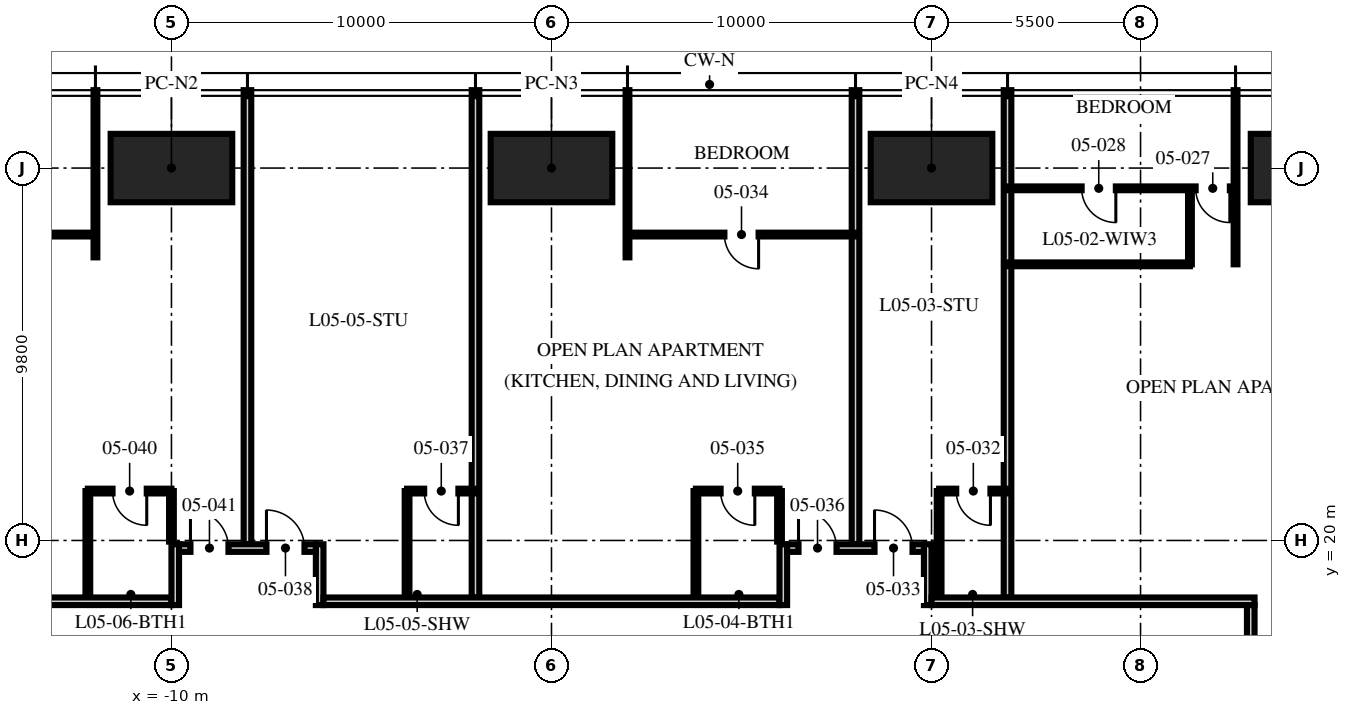
"""IFC4 building model, lengths in metres.
Left out: names, types, materials, properties, quantities, classifications, styles, units other than length and angle.
Written with IfcOpenShell. Run it as: python <this file> out.ifc"""

import sys

from ifc_helpers import new_model, si_unit, direction, frame, frame_2d, origin, origin_2d, place, context, subcontext, project, spatial, rectangle, hollow_rectangle, extrude, element, fill, save


model = new_model("IFC4")
c1 = context("Model", 3, precision=1e-05, world=origin(), true_north=direction((0.0, 1.0)))
c2 = subcontext(c1, "Body", "Model", "MODEL_VIEW")
j1 = project(units=[si_unit("LENGTHUNIT", "METRE"), si_unit("PLANEANGLEUNIT", "RADIAN")], contexts=[c1])
p1 = place(None, origin())
s1 = spatial("IfcSite", under=j1, at=p1, CompositionType="ELEMENT")
p2 = place(p1, origin())
s2 = spatial("IfcBuilding", under=s1, at=p2, CompositionType="ELEMENT")
p3 = place(p2, frame((0.0, 0.0, 24.75)))
s3 = spatial("IfcBuildingStorey", under=s2, at=p3, CompositionType="ELEMENT", Elevation=24.75)
for number, where, z_axis, x_axis in (
    (1, (-10.0, 29.8, 0.0), (0.0, 0.0, 1.0), (1.0, 0.0, 0.0)),
    (2, (0.0, 29.8, 0.0), (0.0, 0.0, 1.0), (1.0, 0.0, 0.0)),
    (3, (10.0, 29.8, 0.0), (0.0, 0.0, 1.0), (1.0, 0.0, 0.0)),
    (4, (20.0, 29.8, 0.0), (0.0, 0.0, 1.0), (1.0, 0.0, 0.0)),
):
    element("IfcColumn", number, at=place(p3, frame(where, z_axis=z_axis, x_axis=x_axis)), inside=s3, PredefinedType="COLUMN", context=c2, shape_type="SweptSolid", body=[
        extrude(hollow_rectangle(XDim=3.2, YDim=1.8, WallThickness=0.2, at=origin_2d()), origin(), (0.0, 0.0, 1.0), 3.75),
    ])
p4 = place(p3, frame((18.0, 27.267, 0.0), z_axis=(0.0, 0.0, 1.0), x_axis=(0.0, 1.0, 0.0)))
e5 = element("IfcWall", 5, at=p4, inside=s3, PredefinedType="PARTITIONING", context=c2, shape_type="SweptSolid", body=[
    extrude(rectangle(XDim=4.583, YDim=0.1, at=frame_2d((2.292, 0.0))), origin(), (0.0, 0.0, 1.0), 2.71),
])
p5 = place(p3, frame((12.0, 18.5, 0.0), z_axis=(0.0, 0.0, 1.0), x_axis=(0.0, 1.0, 0.0)))
e6 = element("IfcWall", 6, at=p5, inside=s3, PredefinedType="PARTITIONING", context=c2, shape_type="SweptSolid", body=[
    extrude(rectangle(XDim=13.35, YDim=0.2, at=frame_2d((6.675, 0.0))), origin(), (0.0, 0.0, 1.0), 2.71),
])
p6 = place(p3, frame((8.0, 19.9, 0.0), z_axis=(0.0, 0.0, 1.0), x_axis=(0.0, 1.0, 0.0)))
e7 = element("IfcWall", 7, at=p6, inside=s3, PredefinedType="PARTITIONING", context=c2, shape_type="SweptSolid", body=[
    extrude(rectangle(XDim=11.95, YDim=0.2, at=frame_2d((5.975, 0.0))), origin(), (0.0, 0.0, 1.0), 2.71),
])
p7 = place(p3, frame((2.0, 27.45, 0.0), z_axis=(0.0, 0.0, 1.0), x_axis=(0.0, 1.0, 0.0)))
e8 = element("IfcWall", 8, at=p7, inside=s3, PredefinedType="PARTITIONING", context=c2, shape_type="SweptSolid", body=[
    extrude(rectangle(XDim=4.4, YDim=0.1, at=frame_2d((2.2, 0.0))), origin(), (0.0, 0.0, 1.0), 2.71),
])
p8 = place(p3, frame((-2.0, 18.5, 0.0), z_axis=(0.0, 0.0, 1.0), x_axis=(0.0, 1.0, 0.0)))
e9 = element("IfcWall", 9, at=p8, inside=s3, PredefinedType="PARTITIONING", context=c2, shape_type="SweptSolid", body=[
    extrude(rectangle(XDim=13.35, YDim=0.2, at=frame_2d((6.675, 0.0))), origin(), (0.0, 0.0, 1.0), 2.71),
])
p9 = place(p3, frame((-8.0, 19.9, 0.0), z_axis=(0.0, 0.0, 1.0), x_axis=(0.0, 1.0, 0.0)))
e10 = element("IfcWall", 10, at=p9, inside=s3, PredefinedType="PARTITIONING", context=c2, shape_type="SweptSolid", body=[
    extrude(rectangle(XDim=11.95, YDim=0.2, at=frame_2d((5.975, 0.0))), origin(), (0.0, 0.0, 1.0), 2.71),
])
p10 = place(p3, frame((-12.0, 27.45, 0.0), z_axis=(0.0, 0.0, 1.0), x_axis=(0.0, 1.0, 0.0)))
e11 = element("IfcWall", 11, at=p10, inside=s3, PredefinedType="PARTITIONING", context=c2, shape_type="SweptSolid", body=[
    extrude(rectangle(XDim=4.4, YDim=0.1, at=frame_2d((2.2, 0.0))), origin(), (0.0, 0.0, 1.0), 2.71),
])
p11 = place(p3, frame((18.0, 29.267, 0.0), z_axis=(0.0, 0.0, 1.0), x_axis=(-1.0, 0.0, 0.0)))
e12 = element("IfcWall", 12, at=p11, inside=s3, PredefinedType="PARTITIONING", context=c2, shape_type="SweptSolid", body=[
    extrude(rectangle(XDim=6.0, YDim=0.1, at=frame_2d((3.0, 0.0))), origin(), (0.0, 0.0, 1.0), 2.61),
])
p12 = place(p11, frame((0.15, 0.0, 0.0)))
e13 = element("IfcOpeningElement", 13, at=p12, cuts=e12, PredefinedType="OPENING", context=c2, shape_type="SweptSolid", body=[
    extrude(rectangle(XDim=0.9, YDim=2.1, at=frame_2d((0.45, 1.05))), frame((0.0, 0.06, 0.0), z_axis=(0.0, -1.0, 0.0), x_axis=(1.0, 0.0, 0.0)), (0.0, 0.0, 1.0), 0.12),
])
p13 = place(p11, frame((3.15, 0.0, 0.0)))
e14 = element("IfcOpeningElement", 14, at=p13, cuts=e12, PredefinedType="OPENING", context=c2, shape_type="SweptSolid", body=[
    extrude(rectangle(XDim=0.9, YDim=2.1, at=frame_2d((0.45, 1.05))), frame((0.0, 0.06, 0.0), z_axis=(0.0, -1.0, 0.0), x_axis=(1.0, 0.0, 0.0)), (0.0, 0.0, 1.0), 0.12),
])
p14 = place(p3, frame((16.8, 27.267, 0.0), z_axis=(0.0, 0.0, 1.0), x_axis=(0.0, 1.0, 0.0)))
e15 = element("IfcWall", 15, at=p14, inside=s3, PredefinedType="PARTITIONING", context=c2, shape_type="SweptSolid", body=[
    extrude(rectangle(XDim=2.0, YDim=0.1, at=frame_2d((1.0, 0.0))), origin(), (0.0, 0.0, 1.0), 3.5),
])
p15 = place(p3, frame((16.8, 27.267, 0.0), z_axis=(0.0, 0.0, 1.0), x_axis=(-1.0, 0.0, 0.0)))
e16 = element("IfcWall", 16, at=p15, inside=s3, PredefinedType="PARTITIONING", context=c2, shape_type="SweptSolid", body=[
    extrude(rectangle(XDim=4.8, YDim=0.1, at=frame_2d((2.4, 0.0))), origin(), (0.0, 0.0, 1.0), 2.61),
])
p16 = place(p3, frame((12.0, 21.3, 0.0), z_axis=(0.0, 0.0, 1.0), x_axis=(-1.0, 0.0, 0.0)))
e17 = element("IfcWall", 17, at=p16, inside=s3, PredefinedType="PARTITIONING", context=c2, shape_type="SweptSolid", body=[
    extrude(rectangle(XDim=1.8, YDim=0.125, at=frame_2d((0.9, 0.0))), origin(), (0.0, 0.0, 1.0), 3.5),
])
p17 = place(p16, frame((0.45, 0.0, 0.0)))
e18 = element("IfcOpeningElement", 18, at=p17, cuts=e17, PredefinedType="OPENING", context=c2, shape_type="SweptSolid", body=[
    extrude(rectangle(XDim=0.9, YDim=2.1, at=frame_2d((0.45, 1.05))), frame((0.0, 0.073, 0.0), z_axis=(0.0, -1.0, 0.0), x_axis=(1.0, 0.0, 0.0)), (0.0, 0.0, 1.0), 0.145),
])
p18 = place(p3, frame((10.2, 18.5, 0.0), z_axis=(0.0, 0.0, 1.0), x_axis=(0.0, 1.0, 0.0)))
e19 = element("IfcWall", 19, at=p18, inside=s3, PredefinedType="PARTITIONING", context=c2, shape_type="SweptSolid", body=[
    extrude(rectangle(XDim=2.8, YDim=0.125, at=frame_2d((1.4, 0.0))), origin(), (0.0, 0.0, 1.0), 2.492),
])
p19 = place(p3, frame((8.0, 28.05, 0.0), z_axis=(0.0, 0.0, 1.0), x_axis=(-1.0, 0.0, 0.0)))
e20 = element("IfcWall", 20, at=p19, inside=s3, PredefinedType="PARTITIONING", context=c2, shape_type="SweptSolid", body=[
    extrude(rectangle(XDim=6.0, YDim=0.1, at=frame_2d((3.0, 0.0))), origin(), (0.0, 0.0, 1.0), 2.61),
])
p20 = place(p19, frame((2.55, 0.0, 0.0)))
e21 = element("IfcOpeningElement", 21, at=p20, cuts=e20, PredefinedType="OPENING", context=c2, shape_type="SweptSolid", body=[
    extrude(rectangle(XDim=0.9, YDim=2.1, at=frame_2d((0.45, 1.05))), frame((0.0, 0.06, 0.0), z_axis=(0.0, -1.0, 0.0), x_axis=(1.0, 0.0, 0.0)), (0.0, 0.0, 1.0), 0.12),
])
p21 = place(p3, frame((6.0, 21.3, 0.0), z_axis=(0.0, 0.0, 1.0), x_axis=(-1.0, 0.0, 0.0)))
e22 = element("IfcWall", 22, at=p21, inside=s3, PredefinedType="PARTITIONING", context=c2, shape_type="SweptSolid", body=[
    extrude(rectangle(XDim=2.2, YDim=0.125, at=frame_2d((1.1, 0.0))), origin(), (0.0, 0.0, 1.0), 2.61),
])
p22 = place(p21, frame((0.65, 0.0, 0.0)))
e23 = element("IfcOpeningElement", 23, at=p22, cuts=e22, PredefinedType="OPENING", context=c2, shape_type="SweptSolid", body=[
    extrude(rectangle(XDim=0.9, YDim=2.1, at=frame_2d((0.45, 1.05))), frame((0.0, 0.073, 0.0), z_axis=(0.0, -1.0, 0.0), x_axis=(1.0, 0.0, 0.0)), (0.0, 0.0, 1.0), 0.145),
])
p23 = place(p3, frame((6.0, 19.97, 0.0), z_axis=(0.0, 0.0, 1.0), x_axis=(0.0, 1.0, 0.0)))
e24 = element("IfcWall", 24, at=p23, inside=s3, PredefinedType="PARTITIONING", context=c2, shape_type="SweptSolid", body=[
    extrude(rectangle(XDim=1.33, YDim=0.125, at=frame_2d((0.665, 0.0))), origin(), (0.0, 0.0, 1.0), 3.5),
])
p24 = place(p3, frame((3.8, 18.5, 0.0), z_axis=(0.0, 0.0, 1.0), x_axis=(0.0, 1.0, 0.0)))
e25 = element("IfcWall", 25, at=p24, inside=s3, PredefinedType="PARTITIONING", context=c2, shape_type="SweptSolid", body=[
    extrude(rectangle(XDim=2.8, YDim=0.125, at=frame_2d((1.4, 0.0))), origin(), (0.0, 0.0, 1.0), 3.5),
])
p25 = place(p3, frame((-2.0, 21.3, 0.0), z_axis=(0.0, 0.0, 1.0), x_axis=(-1.0, 0.0, 0.0)))
e26 = element("IfcWall", 26, at=p25, inside=s3, PredefinedType="PARTITIONING", context=c2, shape_type="SweptSolid", body=[
    extrude(rectangle(XDim=1.8, YDim=0.125, at=frame_2d((0.9, 0.0))), origin(), (0.0, 0.0, 1.0), 3.5),
])
p26 = place(p25, frame((0.45, 0.0, 0.0)))
e27 = element("IfcOpeningElement", 27, at=p26, cuts=e26, PredefinedType="OPENING", context=c2, shape_type="SweptSolid", body=[
    extrude(rectangle(XDim=0.9, YDim=2.1, at=frame_2d((0.45, 1.05))), frame((0.0, 0.073, 0.0), z_axis=(0.0, -1.0, 0.0), x_axis=(1.0, 0.0, 0.0)), (0.0, 0.0, 1.0), 0.145),
])
p27 = place(p3, frame((-3.8, 18.5, 0.0), z_axis=(0.0, 0.0, 1.0), x_axis=(0.0, 1.0, 0.0)))
e28 = element("IfcWall", 28, at=p27, inside=s3, PredefinedType="PARTITIONING", context=c2, shape_type="SweptSolid", body=[
    extrude(rectangle(XDim=2.8, YDim=0.125, at=frame_2d((1.4, 0.0))), origin(), (0.0, 0.0, 1.0), 3.5),
])
p28 = place(p3, frame((-12.0, 28.05, 0.0), z_axis=(0.0, 0.0, 1.0), x_axis=(-1.0, 0.0, 0.0)))
e29 = element("IfcWall", 29, at=p28, inside=s3, PredefinedType="PARTITIONING", context=c2, shape_type="SweptSolid", body=[
    extrude(rectangle(XDim=6.0, YDim=0.1, at=frame_2d((3.0, 0.0))), origin(), (0.0, 0.0, 1.0), 2.61),
])
p29 = place(p28, frame((2.55, 0.0, 0.0)))
e30 = element("IfcOpeningElement", 30, at=p29, cuts=e29, PredefinedType="OPENING", context=c2, shape_type="SweptSolid", body=[
    extrude(rectangle(XDim=0.9, YDim=2.1, at=frame_2d((0.45, 1.05))), frame((0.0, 0.06, 0.0), z_axis=(0.0, -1.0, 0.0), x_axis=(1.0, 0.0, 0.0)), (0.0, 0.0, 1.0), 0.12),
])
p30 = place(p3, frame((-10.0, 21.3, 0.0), z_axis=(0.0, 0.0, 1.0), x_axis=(-1.0, 0.0, 0.0)))
e31 = element("IfcWall", 31, at=p30, inside=s3, PredefinedType="PARTITIONING", context=c2, shape_type="SweptSolid", body=[
    extrude(rectangle(XDim=2.2, YDim=0.125, at=frame_2d((1.1, 0.0))), origin(), (0.0, 0.0, 1.0), 2.492),
])
p31 = place(p30, frame((0.65, 0.0, 0.0)))
e32 = element("IfcOpeningElement", 32, at=p31, cuts=e31, PredefinedType="OPENING", context=c2, shape_type="SweptSolid", body=[
    extrude(rectangle(XDim=0.9, YDim=2.1, at=frame_2d((0.45, 1.05))), frame((0.0, 0.073, 0.0), z_axis=(0.0, -1.0, 0.0), x_axis=(1.0, 0.0, 0.0)), (0.0, 0.0, 1.0), 0.145),
])
p32 = place(p3, frame((-10.0, 19.97, 0.0), z_axis=(0.0, 0.0, 1.0), x_axis=(0.0, 1.0, 0.0)))
e33 = element("IfcWall", 33, at=p32, inside=s3, PredefinedType="PARTITIONING", context=c2, shape_type="SweptSolid", body=[
    extrude(rectangle(XDim=1.33, YDim=0.125, at=frame_2d((0.665, 0.0))), origin(), (0.0, 0.0, 1.0), 2.492),
])
p33 = place(p3, frame((-12.2, 18.5, 0.0), z_axis=(0.0, 0.0, 1.0), x_axis=(0.0, 1.0, 0.0)))
e34 = element("IfcWall", 34, at=p33, inside=s3, PredefinedType="PARTITIONING", context=c2, shape_type="SweptSolid", body=[
    extrude(rectangle(XDim=2.8, YDim=0.125, at=frame_2d((1.4, 0.0))), origin(), (0.0, 0.0, 1.0), 3.5),
])
p34 = place(p3, frame((18.4, 0.0, 0.0), z_axis=(0.0, 0.0, 1.0), x_axis=(0.0, 1.0, 0.0)))
e35 = element("IfcWall", 35, at=p34, inside=s3, PredefinedType="PARTITIONING", context=c2, shape_type="SweptSolid", body=[
    extrude(rectangle(XDim=18.3, YDim=0.2, at=frame_2d((9.15, 0.0))), origin(), (0.0, 0.0, 1.0), 2.3),
])
p35 = place(p3, frame((-18.5, 18.4, 0.0), z_axis=(0.0, 0.0, 1.0), x_axis=(1.0, 0.0, 0.0)))
e36 = element("IfcWall", 36, at=p35, inside=s3, PredefinedType="PARTITIONING", context=c2, shape_type="SweptSolid", body=[
    extrude(rectangle(XDim=8.5, YDim=0.2, at=frame_2d((4.25, 0.0))), origin(), (0.0, 0.0, 1.0), 2.3),
])
p36 = place(p3, frame((-9.9, 18.3, 0.0), z_axis=(0.0, 0.0, 1.0), x_axis=(0.0, 1.0, 0.0)))
e37 = element("IfcWall", 37, at=p36, inside=s3, PredefinedType="PARTITIONING", context=c2, shape_type="SweptSolid", body=[
    extrude(rectangle(XDim=1.6, YDim=0.2, at=frame_2d((0.8, 0.0))), origin(), (0.0, 0.0, 1.0), 2.492),
])
p37 = place(p3, frame((-6.1, 18.3, 0.0), z_axis=(0.0, 0.0, 1.0), x_axis=(0.0, 1.0, 0.0)))
e38 = element("IfcWall", 38, at=p37, inside=s3, PredefinedType="PARTITIONING", context=c2, shape_type="SweptSolid", body=[
    extrude(rectangle(XDim=1.6, YDim=0.2, at=frame_2d((0.8, 0.0))), origin(), (0.0, 0.0, 1.0), 3.5),
])
p38 = place(p3, frame((-9.8, 19.8, 0.0), z_axis=(0.0, 0.0, 1.0), x_axis=(1.0, 0.0, 0.0)))
e39 = element("IfcWall", 39, at=p38, inside=s3, PredefinedType="PARTITIONING", context=c2, shape_type="SweptSolid", body=[
    extrude(rectangle(XDim=3.6, YDim=0.2, at=frame_2d((1.8, 0.0))), origin(), (0.0, 0.0, 1.0), 3.5),
])
p39 = place(p38, frame((2.3, 0.0, 0.0)))
e40 = element("IfcOpeningElement", 40, at=p39, cuts=e39, PredefinedType="OPENING", context=c2, shape_type="SweptSolid", body=[
    extrude(rectangle(XDim=1.0, YDim=2.2, at=frame_2d((0.5, 1.1))), frame((0.0, 0.11, 0.0), z_axis=(0.0, -1.0, 0.0), x_axis=(1.0, 0.0, 0.0)), (0.0, 0.0, 1.0), 0.22),
])
p40 = place(p38, frame((0.3, 0.0, 0.0)))
e41 = element("IfcOpeningElement", 41, at=p40, cuts=e39, PredefinedType="OPENING", context=c2, shape_type="SweptSolid", body=[
    extrude(rectangle(XDim=1.0, YDim=2.2, at=frame_2d((0.5, 1.1))), frame((0.0, 0.11, 0.0), z_axis=(0.0, -1.0, 0.0), x_axis=(1.0, 0.0, 0.0)), (0.0, 0.0, 1.0), 0.22),
])
p41 = place(p3, frame((-6.0, 18.4, 0.0), z_axis=(0.0, 0.0, 1.0), x_axis=(1.0, 0.0, 0.0)))
e42 = element("IfcWall", 42, at=p41, inside=s3, PredefinedType="PARTITIONING", context=c2, shape_type="SweptSolid", body=[
    extrude(rectangle(XDim=12.0, YDim=0.2, at=frame_2d((6.0, 0.0))), origin(), (0.0, 0.0, 1.0), 2.492),
])
p42 = place(p3, frame((6.1, 18.3, 0.0), z_axis=(0.0, 0.0, 1.0), x_axis=(0.0, 1.0, 0.0)))
e43 = element("IfcWall", 43, at=p42, inside=s3, PredefinedType="PARTITIONING", context=c2, shape_type="SweptSolid", body=[
    extrude(rectangle(XDim=1.6, YDim=0.2, at=frame_2d((0.8, 0.0))), origin(), (0.0, 0.0, 1.0), 3.5),
])
p43 = place(p3, frame((9.9, 18.3, 0.0), z_axis=(0.0, 0.0, 1.0), x_axis=(0.0, 1.0, 0.0)))
e44 = element("IfcWall", 44, at=p43, inside=s3, PredefinedType="PARTITIONING", context=c2, shape_type="SweptSolid", body=[
    extrude(rectangle(XDim=1.6, YDim=0.2, at=frame_2d((0.8, 0.0))), origin(), (0.0, 0.0, 1.0), 2.492),
])
p44 = place(p3, frame((6.2, 19.8, 0.0), z_axis=(0.0, 0.0, 1.0), x_axis=(1.0, 0.0, 0.0)))
e45 = element("IfcWall", 45, at=p44, inside=s3, PredefinedType="PARTITIONING", context=c2, shape_type="SweptSolid", body=[
    extrude(rectangle(XDim=3.6, YDim=0.2, at=frame_2d((1.8, 0.0))), origin(), (0.0, 0.0, 1.0), 3.5),
])
p45 = place(p44, frame((2.3, 0.0, 0.0)))
e46 = element("IfcOpeningElement", 46, at=p45, cuts=e45, PredefinedType="OPENING", context=c2, shape_type="SweptSolid", body=[
    extrude(rectangle(XDim=1.0, YDim=2.2, at=frame_2d((0.5, 1.1))), frame((0.0, 0.11, 0.0), z_axis=(0.0, -1.0, 0.0), x_axis=(1.0, 0.0, 0.0)), (0.0, 0.0, 1.0), 0.22),
])
p46 = place(p44, frame((0.3, 0.0, 0.0)))
e47 = element("IfcOpeningElement", 47, at=p46, cuts=e45, PredefinedType="OPENING", context=c2, shape_type="SweptSolid", body=[
    extrude(rectangle(XDim=1.0, YDim=2.2, at=frame_2d((0.5, 1.1))), frame((0.0, 0.11, 0.0), z_axis=(0.0, -1.0, 0.0), x_axis=(1.0, 0.0, 0.0)), (0.0, 0.0, 1.0), 0.22),
])
p47 = place(p3, frame((10.0, 18.4, 0.0), z_axis=(0.0, 0.0, 1.0), x_axis=(1.0, 0.0, 0.0)))
e48 = element("IfcWall", 48, at=p47, inside=s3, PredefinedType="PARTITIONING", context=c2, shape_type="SweptSolid", body=[
    extrude(rectangle(XDim=8.5, YDim=0.2, at=frame_2d((4.25, 0.0))), origin(), (0.0, 0.0, 1.0), 2.3),
])
p48 = place(p12, origin())
e49 = element("IfcDoor", 49, at=p48, inside=s3, OperationType="SINGLE_SWING_LEFT", PredefinedType="DOOR", context=c2, shape_type="SweptSolid", body=[
    extrude(rectangle(XDim=0.9, YDim=2.1, at=frame_2d((0.45, 1.05))), frame((0.0, 0.025, 0.0), z_axis=(0.0, -1.0, 0.0), x_axis=(1.0, 0.0, 0.0)), (0.0, 0.0, 1.0), 0.05),
])
fill(e13, e49)
p49 = place(p13, origin())
e50 = element("IfcDoor", 50, at=p49, inside=s3, OperationType="SINGLE_SWING_LEFT", PredefinedType="DOOR", context=c2, shape_type="SweptSolid", body=[
    extrude(rectangle(XDim=0.9, YDim=2.1, at=frame_2d((0.45, 1.05))), frame((0.0, 0.025, 0.0), z_axis=(0.0, -1.0, 0.0), x_axis=(1.0, 0.0, 0.0)), (0.0, 0.0, 1.0), 0.05),
])
fill(e14, e50)
p50 = place(p17, origin())
e51 = element("IfcDoor", 51, at=p50, inside=s3, OperationType="SINGLE_SWING_LEFT", PredefinedType="DOOR", context=c2, shape_type="SweptSolid", body=[
    extrude(rectangle(XDim=0.9, YDim=2.1, at=frame_2d((0.45, 1.05))), frame((0.0, 0.025, 0.0), z_axis=(0.0, -1.0, 0.0), x_axis=(1.0, 0.0, 0.0)), (0.0, 0.0, 1.0), 0.05),
])
fill(e18, e51)
p51 = place(p45, origin())
e52 = element("IfcDoor", 52, at=p51, inside=s3, OperationType="SINGLE_SWING_LEFT", PredefinedType="DOOR", context=c2, shape_type="SweptSolid", body=[
    extrude(rectangle(XDim=1.0, YDim=2.2, at=frame_2d((0.5, 1.1))), frame((0.0, 0.025, 0.0), z_axis=(0.0, -1.0, 0.0), x_axis=(1.0, 0.0, 0.0)), (0.0, 0.0, 1.0), 0.05),
])
fill(e46, e52)
p52 = place(p20, origin())
e53 = element("IfcDoor", 53, at=p52, inside=s3, OperationType="SINGLE_SWING_LEFT", PredefinedType="DOOR", context=c2, shape_type="SweptSolid", body=[
    extrude(rectangle(XDim=0.9, YDim=2.1, at=frame_2d((0.45, 1.05))), frame((0.0, 0.025, 0.0), z_axis=(0.0, -1.0, 0.0), x_axis=(1.0, 0.0, 0.0)), (0.0, 0.0, 1.0), 0.05),
])
fill(e21, e53)
p53 = place(p22, origin())
e54 = element("IfcDoor", 54, at=p53, inside=s3, OperationType="SINGLE_SWING_LEFT", PredefinedType="DOOR", context=c2, shape_type="SweptSolid", body=[
    extrude(rectangle(XDim=0.9, YDim=2.1, at=frame_2d((0.45, 1.05))), frame((0.0, 0.025, 0.0), z_axis=(0.0, -1.0, 0.0), x_axis=(1.0, 0.0, 0.0)), (0.0, 0.0, 1.0), 0.05),
])
fill(e23, e54)
p54 = place(p46, origin())
e55 = element("IfcDoor", 55, at=p54, inside=s3, OperationType="SINGLE_SWING_LEFT", PredefinedType="DOOR", context=c2, shape_type="SweptSolid", body=[
    extrude(rectangle(XDim=1.0, YDim=2.2, at=frame_2d((0.5, 1.1))), frame((0.0, 0.025, 0.0), z_axis=(0.0, -1.0, 0.0), x_axis=(1.0, 0.0, 0.0)), (0.0, 0.0, 1.0), 0.05),
])
fill(e47, e55)
p55 = place(p26, origin())
e56 = element("IfcDoor", 56, at=p55, inside=s3, OperationType="SINGLE_SWING_LEFT", PredefinedType="DOOR", context=c2, shape_type="SweptSolid", body=[
    extrude(rectangle(XDim=0.9, YDim=2.1, at=frame_2d((0.45, 1.05))), frame((0.0, 0.025, 0.0), z_axis=(0.0, -1.0, 0.0), x_axis=(1.0, 0.0, 0.0)), (0.0, 0.0, 1.0), 0.05),
])
fill(e27, e56)
p56 = place(p39, origin())
e57 = element("IfcDoor", 57, at=p56, inside=s3, OperationType="SINGLE_SWING_LEFT", PredefinedType="DOOR", context=c2, shape_type="SweptSolid", body=[
    extrude(rectangle(XDim=1.0, YDim=2.2, at=frame_2d((0.5, 1.1))), frame((0.0, 0.025, 0.0), z_axis=(0.0, -1.0, 0.0), x_axis=(1.0, 0.0, 0.0)), (0.0, 0.0, 1.0), 0.05),
])
fill(e40, e57)
p57 = place(p31, origin())
e58 = element("IfcDoor", 58, at=p57, inside=s3, OperationType="SINGLE_SWING_LEFT", PredefinedType="DOOR", context=c2, shape_type="SweptSolid", body=[
    extrude(rectangle(XDim=0.9, YDim=2.1, at=frame_2d((0.45, 1.05))), frame((0.0, 0.025, 0.0), z_axis=(0.0, -1.0, 0.0), x_axis=(1.0, 0.0, 0.0)), (0.0, 0.0, 1.0), 0.05),
])
fill(e32, e58)
p58 = place(p40, origin())
e59 = element("IfcDoor", 59, at=p58, inside=s3, OperationType="SINGLE_SWING_LEFT", PredefinedType="DOOR", context=c2, shape_type="SweptSolid", body=[
    extrude(rectangle(XDim=1.0, YDim=2.2, at=frame_2d((0.5, 1.1))), frame((0.0, 0.025, 0.0), z_axis=(0.0, -1.0, 0.0), x_axis=(1.0, 0.0, 0.0)), (0.0, 0.0, 1.0), 0.05),
])
fill(e41, e59)
save(model, sys.argv[1])
